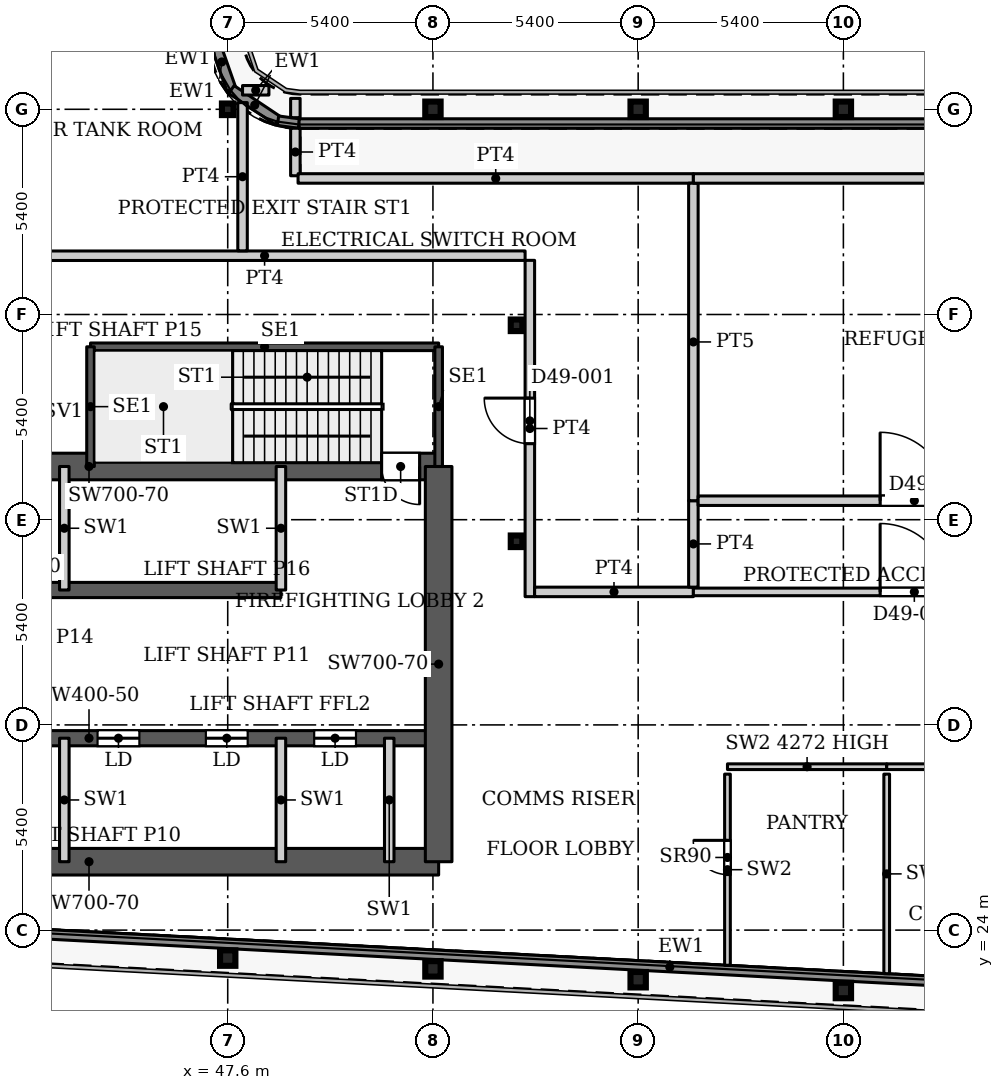
"""IFC4 building model, lengths in metres.
Left out: names, types, materials, properties, quantities, classifications, styles, units other than length and angle.
Written with IfcOpenShell. Run it as: python <this file> out.ifc"""

import sys

from ifc_helpers import new_model, si_unit, direction, frame, frame_2d, origin, origin_2d, place, context, subcontext, project, spatial, rectangle, hollow_rectangle, i_section, extrude, source, transform, mapped, element, fill, save


model = new_model("IFC4")
c1 = context("Model", 3, precision=1e-05, world=origin(), true_north=direction((0.0, 1.0)))
c2 = subcontext(c1, "Body", "Model", "MODEL_VIEW")
j1 = project(units=[si_unit("LENGTHUNIT", "METRE"), si_unit("PLANEANGLEUNIT", "RADIAN")], contexts=[c1])
p1 = place(None, origin())
s1 = spatial("IfcSite", under=j1, at=p1, CompositionType="ELEMENT")
p2 = place(p1, origin())
s2 = spatial("IfcBuilding", under=s1, at=p2, CompositionType="ELEMENT")
p3 = place(p2, frame((0.0, 0.0, 211.1)))
s3 = spatial("IfcBuildingStorey", under=s2, at=p3, CompositionType="ELEMENT", Elevation=211.1)
for number, where, z_axis, x_axis in (
    (1, (63.8, 22.411, 0.0), (0.0, 0.0, 1.0), (1.0, 0.0, 0.0)),
    (2, (58.4, 22.695, 0.0), (0.0, 0.0, 1.0), (1.0, 0.0, 0.0)),
    (3, (53.0, 22.98, 0.0), (0.0, 0.0, 1.0), (1.0, 0.0, 0.0)),
    (4, (47.6, 23.264, 0.0), (0.0, 0.0, 1.0), (1.0, 0.0, 0.0)),
    (5, (53.0, 45.6, 0.0), (0.0, 0.0, 1.0), (1.0, 0.0, 0.0)),
    (6, (58.4, 45.6, 0.0), (0.0, 0.0, 1.0), (1.0, 0.0, 0.0)),
    (7, (63.8, 45.6, 0.0), (0.0, 0.0, 1.0), (1.0, 0.0, 0.0)),
):
    element("IfcColumn", number, at=place(p3, frame(where, z_axis=z_axis, x_axis=x_axis)), inside=s3, PredefinedType="COLUMN", context=c2, shape_type="SweptSolid", body=[
        extrude(i_section(OverallWidth=0.404, OverallDepth=0.407, WebThickness=0.027, FlangeThickness=0.044, FilletRadius=0.012, at=origin_2d()), origin(), (0.0, 0.0, 1.0), 5.1),
    ])
for number, where, z_axis, x_axis in (
    (8, (55.2, 34.232, 0.0), (0.0, 0.0, 1.0), (1.0, 0.0, 0.0)),
    (9, (55.2, 39.916, 0.0), (0.0, 0.0, 1.0), (1.0, 0.0, 0.0)),
    (10, (47.6, 45.6, 0.0), (0.0, 0.0, 1.0), (1.0, 0.0, 0.0)),
):
    element("IfcColumn", number, at=place(p3, frame(where, z_axis=z_axis, x_axis=x_axis)), inside=s3, PredefinedType="COLUMN", context=c2, shape_type="SweptSolid", body=[
        extrude(hollow_rectangle(XDim=0.305, YDim=0.305, WallThickness=0.016, InnerFilletRadius=0.016, OuterFilletRadius=0.032, at=origin_2d()), origin(), (0.0, 0.0, 1.0), 5.1),
    ])
p4 = place(p3, frame((34.75, 25.8, 0.0), z_axis=(0.0, 0.0, 1.0), x_axis=(1.0, 0.0, 0.0)))
e11 = element("IfcWall", 11, at=p4, inside=s3, PredefinedType="SHEAR", context=c2, shape_type="SweptSolid", body=[
    extrude(rectangle(XDim=18.4, YDim=0.7, at=frame_2d((9.2, 0.0))), origin(), (0.0, 0.0, 1.0), 5.1),
])
p5 = place(p3, frame((34.75, 29.05, 0.0), z_axis=(0.0, 0.0, 1.0), x_axis=(1.0, 0.0, 0.0)))
e12 = element("IfcWall", 12, at=p5, inside=s3, PredefinedType="SHEAR", context=c2, shape_type="SweptSolid", body=[
    extrude(rectangle(XDim=18.4, YDim=0.4, at=frame_2d((9.2, 0.0))), origin(), (0.0, 0.0, 1.0), 5.1),
])
p6 = place(p5, frame((0.875, 0.0, 0.0)))
e13 = element("IfcOpeningElement", 13, at=p6, cuts=e12, PredefinedType="OPENING", context=c2, shape_type="SweptSolid", body=[
    extrude(rectangle(XDim=1.1, YDim=2.2, at=frame_2d((0.55, 1.1))), frame((0.0, 0.21, 0.0), z_axis=(0.0, -1.0, 0.0), x_axis=(1.0, 0.0, 0.0)), (0.0, 0.0, 1.0), 0.42),
])
p7 = place(p5, frame((3.725, 0.0, 0.0)))
e14 = element("IfcOpeningElement", 14, at=p7, cuts=e12, PredefinedType="OPENING", context=c2, shape_type="SweptSolid", body=[
    extrude(rectangle(XDim=1.1, YDim=2.2, at=frame_2d((0.55, 1.1))), frame((0.0, 0.21, 0.0), z_axis=(0.0, -1.0, 0.0), x_axis=(1.0, 0.0, 0.0)), (0.0, 0.0, 1.0), 0.42),
])
p8 = place(p5, frame((6.575, 0.0, 0.0)))
e15 = element("IfcOpeningElement", 15, at=p8, cuts=e12, PredefinedType="OPENING", context=c2, shape_type="SweptSolid", body=[
    extrude(rectangle(XDim=1.1, YDim=2.2, at=frame_2d((0.55, 1.1))), frame((0.0, 0.21, 0.0), z_axis=(0.0, -1.0, 0.0), x_axis=(1.0, 0.0, 0.0)), (0.0, 0.0, 1.0), 0.42),
])
p9 = place(p5, frame((9.425, 0.0, 0.0)))
e16 = element("IfcOpeningElement", 16, at=p9, cuts=e12, PredefinedType="OPENING", context=c2, shape_type="SweptSolid", body=[
    extrude(rectangle(XDim=1.1, YDim=2.2, at=frame_2d((0.55, 1.1))), frame((0.0, 0.21, 0.0), z_axis=(0.0, -1.0, 0.0), x_axis=(1.0, 0.0, 0.0)), (0.0, 0.0, 1.0), 0.42),
])
p10 = place(p5, frame((12.275, 0.0, 0.0)))
e17 = element("IfcOpeningElement", 17, at=p10, cuts=e12, PredefinedType="OPENING", context=c2, shape_type="SweptSolid", body=[
    extrude(rectangle(XDim=1.1, YDim=2.2, at=frame_2d((0.55, 1.1))), frame((0.0, 0.21, 0.0), z_axis=(0.0, -1.0, 0.0), x_axis=(1.0, 0.0, 0.0)), (0.0, 0.0, 1.0), 0.42),
])
p11 = place(p5, frame((15.125, 0.0, 0.0)))
e18 = element("IfcOpeningElement", 18, at=p11, cuts=e12, PredefinedType="OPENING", context=c2, shape_type="SweptSolid", body=[
    extrude(rectangle(XDim=1.1, YDim=2.2, at=frame_2d((0.55, 1.1))), frame((0.0, 0.21, 0.0), z_axis=(0.0, -1.0, 0.0), x_axis=(1.0, 0.0, 0.0)), (0.0, 0.0, 1.0), 0.42),
])
p12 = place(p3, frame((34.75, 32.95, 0.0), z_axis=(0.0, 0.0, 1.0), x_axis=(1.0, 0.0, 0.0)))
e19 = element("IfcWall", 19, at=p12, inside=s3, PredefinedType="SHEAR", context=c2, shape_type="SweptSolid", body=[
    extrude(rectangle(XDim=14.25, YDim=0.4, at=frame_2d((7.125, 0.0))), origin(), (0.0, 0.0, 1.0), 5.1),
])
p13 = place(p3, frame((34.75, 36.2, 0.0), z_axis=(0.0, 0.0, 1.0), x_axis=(1.0, 0.0, 0.0)))
e20 = element("IfcWall", 20, at=p13, inside=s3, PredefinedType="SHEAR", context=c2, shape_type="SweptSolid", body=[
    extrude(rectangle(XDim=18.4, YDim=0.7, at=frame_2d((9.2, 0.0))), origin(), (0.0, 0.0, 1.0), 5.1),
])
p14 = place(p13, frame((16.9, 0.0, 0.0)))
e21 = element("IfcOpeningElement", 21, at=p14, cuts=e20, PredefinedType="OPENING", context=c2, shape_type="SweptSolid", body=[
    extrude(rectangle(XDim=1.0, YDim=2.2, at=frame_2d((0.5, 1.1))), frame((0.0, 0.36, 0.0), z_axis=(0.0, -1.0, 0.0), x_axis=(1.0, 0.0, 0.0)), (0.0, 0.0, 1.0), 0.72),
])
p15 = place(p3, frame((53.15, 25.8, 0.0), z_axis=(0.0, 0.0, 1.0), x_axis=(0.0, 1.0, 0.0)))
e22 = element("IfcWall", 22, at=p15, inside=s3, PredefinedType="SHEAR", context=c2, shape_type="SweptSolid", body=[
    extrude(rectangle(XDim=10.4, YDim=0.7, at=frame_2d((5.2, 0.0))), origin(), (0.0, 0.0, 1.0), 5.1),
])
p16 = place(p3, frame((84.427, 21.701, 0.0), z_axis=(0.0, 0.0, 1.0), x_axis=(-0.998617722402, 0.052560864767, 0.0)))
e23 = element("IfcWall", 23, at=p16, inside=s3, PredefinedType="SOLIDWALL", context=c2, shape_type="SweptSolid", body=[
    extrude(rectangle(XDim=50.458, YDim=0.25, at=frame_2d((25.229, 0.0))), origin(), (0.0, 0.0, 1.0), 4.95),
])
p17 = place(p3, frame((47.188, 47.571, 0.0), z_axis=(0.0, 0.0, 1.0), x_axis=(0.331615835646, -0.943414509931, 0.0)))
e24 = element("IfcWall", 24, at=p17, inside=s3, PredefinedType="SOLIDWALL", context=c2, shape_type="SweptSolid", body=[
    extrude(rectangle(XDim=1.538, YDim=0.25, at=frame_2d((0.769, 0.0))), origin(), (0.0, 0.0, 1.0), 4.95),
])
p18 = place(p3, frame((47.698, 46.12, 0.0), z_axis=(0.0, 0.0, 1.0), x_axis=(0.831209040074, -0.555960009082, 0.0)))
e25 = element("IfcWall", 25, at=p18, inside=s3, PredefinedType="SOLIDWALL", context=c2, shape_type="SweptSolid", body=[
    extrude(rectangle(XDim=1.475, YDim=0.25, at=frame_2d((0.738, 0.0))), origin(), (0.0, 0.0, 1.0), 4.95),
])
p19 = place(p3, frame((48.924, 45.3, 0.0), z_axis=(0.0, 0.0, 1.0), x_axis=(0.990938998022, -0.134312703043, 0.0)))
e26 = element("IfcWall", 26, at=p19, inside=s3, PredefinedType="SOLIDWALL", context=c2, shape_type="SweptSolid", body=[
    extrude(rectangle(XDim=0.558, YDim=0.25, at=frame_2d((0.279, 0.0))), origin(), (0.0, 0.0, 1.0), 4.95),
])
p20 = place(p3, frame((49.477, 45.225, 0.0), z_axis=(0.0, 0.0, 1.0), x_axis=(1.0, 0.0, 0.0)))
e27 = element("IfcWall", 27, at=p20, inside=s3, PredefinedType="SOLIDWALL", context=c2, shape_type="SweptSolid", body=[
    extrude(rectangle(XDim=34.812, YDim=0.25, at=frame_2d((17.406, 0.0))), origin(), (0.0, 0.0, 1.0), 4.95),
])
p21 = place(p3, frame((43.99, 39.35, 0.0), z_axis=(0.0, 0.0, 1.0), x_axis=(1.0, 0.0, 0.0)))
e28 = element("IfcWall", 28, at=p21, inside=s3, PredefinedType="SHEAR", context=c2, shape_type="SweptSolid", body=[
    extrude(rectangle(XDim=9.16, YDim=0.2, at=frame_2d((4.58, 0.0))), origin(), (0.0, 0.0, 1.0), 5.1),
])
for number, where, z_axis, x_axis in (
    (29, (43.99, 36.2, 0.0), (0.0, 0.0, 1.0), (0.0, 1.0, 0.0)),
    (30, (53.15, 36.2, 0.0), (0.0, 0.0, 1.0), (0.0, 1.0, 0.0)),
):
    element("IfcWall", number, at=place(p3, frame(where, z_axis=z_axis, x_axis=x_axis)), inside=s3, PredefinedType="SHEAR", context=c2, shape_type="SweptSolid", body=[
        extrude(rectangle(XDim=3.15, YDim=0.2, at=frame_2d((1.575, 0.0))), origin(), (0.0, 0.0, 1.0), 5.1),
    ])
for number, where, z_axis, x_axis in (
    (31, (43.3, 25.8, 0.0), (0.0, 0.0, 1.0), (0.0, 1.0, 0.0)),
    (32, (43.3, 32.95, 0.0), (0.0, 0.0, 1.0), (0.0, 1.0, 0.0)),
    (33, (49.0, 25.8, 0.0), (0.0, 0.0, 1.0), (0.0, 1.0, 0.0)),
    (34, (49.0, 32.95, 0.0), (0.0, 0.0, 1.0), (0.0, 1.0, 0.0)),
    (35, (51.85, 25.8, 0.0), (0.0, 0.0, 1.0), (0.0, 1.0, 0.0)),
):
    element("IfcWall", number, at=place(p3, frame(where, z_axis=z_axis, x_axis=x_axis)), inside=s3, PredefinedType="PARTITIONING", context=c2, shape_type="SweptSolid", body=[
        extrude(rectangle(XDim=3.25, YDim=0.25, at=frame_2d((1.625, 0.0))), origin(), (0.0, 0.0, 1.0), 5.1),
    ])
p22 = place(p3, frame((60.75, 28.3, 0.0), z_axis=(0.0, 0.0, 1.0), x_axis=(1.0, 0.0, 0.0)))
e36 = element("IfcWall", 36, at=p22, inside=s3, PredefinedType="PARTITIONING", context=c2, shape_type="SweptSolid", body=[
    extrude(rectangle(XDim=4.19, YDim=0.15, at=frame_2d((2.095, 0.0))), origin(), (0.0, 0.0, 1.0), 4.272),
])
p23 = place(p3, frame((60.75, 23.075, 0.0), z_axis=(0.0, 0.0, 1.0), x_axis=(0.0, 1.0, 0.0)))
e37 = element("IfcWall", 37, at=p23, inside=s3, PredefinedType="PARTITIONING", context=c2, shape_type="SweptSolid", body=[
    extrude(rectangle(XDim=5.03, YDim=0.15, at=frame_2d((2.515, 0.0))), origin(), (0.0, 0.0, 1.0), 5.1),
])
p24 = place(p23, frame((2.387, 0.0, 0.0)))
e38 = element("IfcOpeningElement", 38, at=p24, cuts=e37, PredefinedType="OPENING", context=c2, shape_type="SweptSolid", body=[
    extrude(rectangle(XDim=0.9, YDim=2.2, at=frame_2d((0.45, 1.1))), frame((0.0, 0.085, 0.0), z_axis=(0.0, -1.0, 0.0), x_axis=(1.0, 0.0, 0.0)), (0.0, 0.0, 1.0), 0.17),
])
p25 = place(p3, frame((64.94, 22.854, 0.0), z_axis=(0.0, 0.0, 1.0), x_axis=(0.0, 1.0, 0.0)))
e39 = element("IfcWall", 39, at=p25, inside=s3, PredefinedType="PARTITIONING", context=c2, shape_type="SweptSolid", body=[
    extrude(rectangle(XDim=5.251, YDim=0.15, at=frame_2d((2.625, 0.0))), origin(), (0.0, 0.0, 1.0), 5.1),
])
p26 = place(p3, frame((64.94, 28.3, 0.0), z_axis=(0.0, 0.0, 1.0), x_axis=(1.0, 0.0, 0.0)))
e40 = element("IfcWall", 40, at=p26, inside=s3, PredefinedType="PARTITIONING", context=c2, shape_type="SweptSolid", body=[
    extrude(rectangle(XDim=5.81, YDim=0.15, at=frame_2d((2.905, 0.0))), origin(), (0.0, 0.0, 1.0), 5.1),
])
p27 = place(p26, frame((2.455, 0.0, 0.0)))
e41 = element("IfcOpeningElement", 41, at=p27, cuts=e40, PredefinedType="OPENING", context=c2, shape_type="SweptSolid", body=[
    extrude(rectangle(XDim=0.9, YDim=2.2, at=frame_2d((0.45, 1.1))), frame((0.0, 0.085, 0.0), z_axis=(0.0, -1.0, 0.0), x_axis=(1.0, 0.0, 0.0)), (0.0, 0.0, 1.0), 0.17),
])
p28 = place(p3, frame((41.715, 41.746, 0.0), z_axis=(0.0, 0.0, 1.0), x_axis=(0.999999989853, 0.000142460288, 0.0)))
e42 = element("IfcWall", 42, at=p28, inside=s3, PredefinedType="PARTITIONING", context=c2, shape_type="SweptSolid", body=[
    extrude(rectangle(XDim=13.71, YDim=0.25, at=frame_2d((6.855, 0.0))), origin(), (0.0, 0.0, 1.0), 4.8),
])
p29 = place(p3, frame((47.99, 41.875, 0.0), z_axis=(0.0, 0.0, 1.0), x_axis=(0.0, 1.0, 0.0)))
e43 = element("IfcWall", 43, at=p29, inside=s3, PredefinedType="PARTITIONING", context=c2, shape_type="SweptSolid", body=[
    extrude(rectangle(XDim=3.901, YDim=0.25, at=frame_2d((1.95, 0.0))), origin(), (0.0, 0.0, 1.0), 4.8),
])
p30 = place(p3, frame((47.99, 46.1, 0.0), z_axis=(0.0, 0.0, 1.0), x_axis=(1.0, 0.0, 0.0)))
e44 = element("IfcWall", 44, at=p30, inside=s3, PredefinedType="PARTITIONING", context=c2, shape_type="SweptSolid", body=[
    extrude(rectangle(XDim=0.694, YDim=0.25, at=frame_2d((0.347, 0.0))), origin(), (0.0, 0.0, 1.0), 4.8),
])
p31 = place(p3, frame((49.38, 43.851, 0.0), z_axis=(0.0, 0.0, 1.0), x_axis=(0.0, 1.0, 0.0)))
e45 = element("IfcWall", 45, at=p31, inside=s3, PredefinedType="PARTITIONING", context=c2, shape_type="SweptSolid", body=[
    extrude(rectangle(XDim=1.25, YDim=0.25, at=frame_2d((0.625, 0.0))), origin(), (0.0, 0.0, 1.0), 4.8),
])
p32 = place(p3, frame((49.38, 45.38, 0.0), z_axis=(0.0, 0.0, 1.0), x_axis=(0.0, 1.0, 0.0)))
e46 = element("IfcWall", 46, at=p32, inside=s3, PredefinedType="PARTITIONING", context=c2, shape_type="SweptSolid", body=[
    extrude(rectangle(XDim=0.507, YDim=0.25, at=frame_2d((0.253, 0.0))), origin(), (0.0, 0.0, 1.0), 4.8),
])
p33 = place(p3, frame((49.451, 43.78, 0.0), z_axis=(0.0, 0.0, 1.0), x_axis=(1.0, 0.0, 0.0)))
e47 = element("IfcWall", 47, at=p33, inside=s3, PredefinedType="PARTITIONING", context=c2, shape_type="SweptSolid", body=[
    extrude(rectangle(XDim=10.402, YDim=0.25, at=frame_2d((5.201, 0.0))), origin(), (0.0, 0.0, 1.0), 4.8),
])
p34 = place(p3, frame((55.55, 32.775, 0.0), z_axis=(0.0, 0.0, 1.0), x_axis=(0.0, 1.0, 0.0)))
e48 = element("IfcWall", 48, at=p34, inside=s3, PredefinedType="PARTITIONING", context=c2, shape_type="SweptSolid", body=[
    extrude(rectangle(XDim=8.85, YDim=0.25, at=frame_2d((4.425, 0.0))), origin(), (0.0, 0.0, 1.0), 4.8),
])
p35 = place(p34, frame((4.025, 0.0, 0.0)))
e49 = element("IfcOpeningElement", 49, at=p35, cuts=e48, PredefinedType="OPENING", context=c2, shape_type="SweptSolid", body=[
    extrude(rectangle(XDim=1.2, YDim=2.1, at=frame_2d((0.6, 1.05))), frame((0.0, 0.135, 0.0), z_axis=(0.0, -1.0, 0.0), x_axis=(1.0, 0.0, 0.0)), (0.0, 0.0, 1.0), 0.27),
])
p36 = place(p3, frame((55.675, 32.9, 0.0), z_axis=(0.0, 0.0, 1.0), x_axis=(1.0, 0.0, 0.0)))
e50 = element("IfcWall", 50, at=p36, inside=s3, PredefinedType="PARTITIONING", context=c2, shape_type="SweptSolid", body=[
    extrude(rectangle(XDim=4.178, YDim=0.25, at=frame_2d((2.089, 0.0))), origin(), (0.0, 0.0, 1.0), 4.8),
])
p37 = place(p3, frame((59.853, 32.9, 0.0), z_axis=(0.0, 0.0, 1.0), x_axis=(1.0, 0.0, 0.0)))
e51 = element("IfcWall", 51, at=p37, inside=s3, PredefinedType="PARTITIONING", context=c2, shape_type="SweptSolid", body=[
    extrude(rectangle(XDim=23.827, YDim=0.2, at=frame_2d((11.914, 0.0))), origin(), (0.0, 0.0, 1.0), 4.8),
])
p38 = place(p37, frame((4.914, 0.0, 0.0)))
e52 = element("IfcOpeningElement", 52, at=p38, cuts=e51, PredefinedType="OPENING", context=c2, shape_type="SweptSolid", body=[
    extrude(rectangle(XDim=1.8, YDim=2.1, at=frame_2d((0.9, 1.05))), frame((0.0, 0.11, 0.0), z_axis=(0.0, -1.0, 0.0), x_axis=(1.0, 0.0, 0.0)), (0.0, 0.0, 1.0), 0.22),
])
p39 = place(p37, frame((16.777, 0.0, 0.0)))
e53 = element("IfcOpeningElement", 53, at=p39, cuts=e51, PredefinedType="OPENING", context=c2, shape_type="SweptSolid", body=[
    extrude(rectangle(XDim=1.8, YDim=2.1, at=frame_2d((0.9, 1.05))), frame((0.0, 0.11, 0.0), z_axis=(0.0, -1.0, 0.0), x_axis=(1.0, 0.0, 0.0)), (0.0, 0.0, 1.0), 0.22),
])
p40 = place(p3, frame((59.853, 33.025, 0.0), z_axis=(0.0, 0.0, 1.0), x_axis=(0.0, 1.0, 0.0)))
e54 = element("IfcWall", 54, at=p40, inside=s3, PredefinedType="PARTITIONING", context=c2, shape_type="SweptSolid", body=[
    extrude(rectangle(XDim=2.275, YDim=0.25, at=frame_2d((1.138, 0.0))), origin(), (0.0, 0.0, 1.0), 4.8),
])
p41 = place(p3, frame((59.853, 35.3, 0.0), z_axis=(0.0, 0.0, 1.0), x_axis=(0.0, 1.0, 0.0)))
e55 = element("IfcWall", 55, at=p41, inside=s3, PredefinedType="PARTITIONING", context=c2, shape_type="SweptSolid", body=[
    extrude(rectangle(XDim=8.355, YDim=0.25, at=frame_2d((4.177, 0.0))), origin(), (0.0, 0.0, 1.0), 4.8),
])
p42 = place(p3, frame((59.853, 43.78, 0.0), z_axis=(0.0, 0.0, 1.0), x_axis=(1.0, 0.0, 0.0)))
e56 = element("IfcWall", 56, at=p42, inside=s3, PredefinedType="PARTITIONING", context=c2, shape_type="SweptSolid", body=[
    extrude(rectangle(XDim=23.852, YDim=0.25, at=frame_2d((11.926, 0.0))), origin(), (0.0, 0.0, 1.0), 4.8),
])
p43 = place(p3, frame((59.978, 35.3, 0.0), z_axis=(0.0, 0.0, 1.0), x_axis=(1.0, 0.0, 0.0)))
e57 = element("IfcWall", 57, at=p43, inside=s3, PredefinedType="PARTITIONING", context=c2, shape_type="SweptSolid", body=[
    extrude(rectangle(XDim=23.477, YDim=0.25, at=frame_2d((11.739, 0.0))), origin(), (0.0, 0.0, 1.0), 4.8),
])
p44 = place(p43, frame((4.789, 0.0, 0.0)))
e58 = element("IfcOpeningElement", 58, at=p44, cuts=e57, PredefinedType="OPENING", context=c2, shape_type="SweptSolid", body=[
    extrude(rectangle(XDim=1.8, YDim=2.1, at=frame_2d((0.9, 1.05))), frame((0.0, 0.135, 0.0), z_axis=(0.0, -1.0, 0.0), x_axis=(1.0, 0.0, 0.0)), (0.0, 0.0, 1.0), 0.27),
])
p45 = place(p43, frame((16.652, 0.0, 0.0)))
e59 = element("IfcOpeningElement", 59, at=p45, cuts=e57, PredefinedType="OPENING", context=c2, shape_type="SweptSolid", body=[
    extrude(rectangle(XDim=1.8, YDim=2.1, at=frame_2d((0.9, 1.05))), frame((0.0, 0.135, 0.0), z_axis=(0.0, -1.0, 0.0), x_axis=(1.0, 0.0, 0.0)), (0.0, 0.0, 1.0), 0.27),
])
m1 = source(origin(), c2, "Body", "SweptSolid", [
    extrude(rectangle(XDim=1.1, YDim=2.2, at=frame_2d((0.55, 1.1))), frame((0.0, 0.025, 0.0), z_axis=(0.0, -1.0, 0.0), x_axis=(1.0, 0.0, 0.0)), (0.0, 0.0, 1.0), 0.05),
])
p46 = place(p9, origin())
e60 = element("IfcDoor", 60, at=p46, inside=s3, OperationType="SLIDING_TO_LEFT", PredefinedType="DOOR", context=c2, shape_type="MappedRepresentation", body=[
    mapped(m1, transform((0.0, 0.0, 0.0), x_axis=(1.0, 0.0, 0.0), y_axis=(0.0, 1.0, 0.0), z_axis=(0.0, 0.0, 1.0), scale=1.0)),
])
fill(e16, e60)
p47 = place(p10, origin())
e61 = element("IfcDoor", 61, at=p47, inside=s3, OperationType="SLIDING_TO_LEFT", PredefinedType="DOOR", context=c2, shape_type="MappedRepresentation", body=[
    mapped(m1, transform((0.0, 0.0, 0.0), x_axis=(1.0, 0.0, 0.0), y_axis=(0.0, 1.0, 0.0), z_axis=(0.0, 0.0, 1.0), scale=1.0)),
])
fill(e17, e61)
p48 = place(p11, origin())
e62 = element("IfcDoor", 62, at=p48, inside=s3, OperationType="SLIDING_TO_LEFT", PredefinedType="DOOR", context=c2, shape_type="MappedRepresentation", body=[
    mapped(m1, transform((0.0, 0.0, 0.0), x_axis=(1.0, 0.0, 0.0), y_axis=(0.0, 1.0, 0.0), z_axis=(0.0, 0.0, 1.0), scale=1.0)),
])
fill(e18, e62)
m2 = source(origin(), c2, "Body", "SweptSolid", [
    extrude(rectangle(XDim=0.9, YDim=2.2, at=frame_2d((0.45, 1.1))), frame((0.0, 0.025, 0.0), z_axis=(0.0, -1.0, 0.0), x_axis=(1.0, 0.0, 0.0)), (0.0, 0.0, 1.0), 0.05),
])
p49 = place(p24, origin())
e63 = element("IfcDoor", 63, at=p49, inside=s3, OperationType="SINGLE_SWING_LEFT", PredefinedType="DOOR", context=c2, shape_type="MappedRepresentation", body=[
    mapped(m2, transform((0.0, 0.0, 0.0), x_axis=(1.0, 0.0, 0.0), y_axis=(0.0, 1.0, 0.0), z_axis=(0.0, 0.0, 1.0), scale=1.0)),
])
fill(e38, e63)
m3 = source(origin(), c2, "Body", "SweptSolid", [
    extrude(rectangle(XDim=1.0, YDim=2.2, at=frame_2d((0.5, 1.1))), frame((0.0, 0.025, 0.0), z_axis=(0.0, -1.0, 0.0), x_axis=(1.0, 0.0, 0.0)), (0.0, 0.0, 1.0), 0.05),
])
p50 = place(p14, origin())
e64 = element("IfcDoor", 64, at=p50, inside=s3, OperationType="SINGLE_SWING_RIGHT", PredefinedType="DOOR", context=c2, shape_type="MappedRepresentation", body=[
    mapped(m3, transform((0.0, 0.0, 0.0), x_axis=(1.0, 0.0, 0.0), y_axis=(0.0, 1.0, 0.0), z_axis=(0.0, 0.0, 1.0), scale=1.0)),
])
fill(e21, e64)
m4 = source(origin(), c2, "Body", "SweptSolid", [
    extrude(rectangle(XDim=1.2, YDim=2.1, at=frame_2d((0.6, 1.05))), frame((0.0, 0.025, 0.0), z_axis=(0.0, -1.0, 0.0), x_axis=(1.0, 0.0, 0.0)), (0.0, 0.0, 1.0), 0.05),
])
p51 = place(p35, origin())
e65 = element("IfcDoor", 65, at=p51, inside=s3, OperationType="SINGLE_SWING_LEFT", PredefinedType="DOOR", context=c2, shape_type="MappedRepresentation", body=[
    mapped(m4, transform((0.0, 0.0, 0.0), x_axis=(1.0, 0.0, 0.0), y_axis=(0.0, 1.0, 0.0), z_axis=(0.0, 0.0, 1.0), scale=1.0)),
])
fill(e49, e65)
m5 = source(origin(), c2, "Body", "SweptSolid", [
    extrude(rectangle(XDim=1.8, YDim=2.1, at=frame_2d((0.9, 1.05))), frame((0.0, 0.025, 0.0), z_axis=(0.0, -1.0, 0.0), x_axis=(1.0, 0.0, 0.0)), (0.0, 0.0, 1.0), 0.05),
])
p52 = place(p44, origin())
e66 = element("IfcDoor", 66, at=p52, inside=s3, OperationType="DOUBLE_DOOR_SINGLE_SWING", PredefinedType="DOOR", context=c2, shape_type="MappedRepresentation", body=[
    mapped(m5, transform((0.0, 0.0, 0.0), x_axis=(1.0, 0.0, 0.0), y_axis=(0.0, 1.0, 0.0), z_axis=(0.0, 0.0, 1.0), scale=1.0)),
])
fill(e58, e66)
m6 = source(origin(), c2, "Body", "SweptSolid", [
    extrude(rectangle(XDim=1.8, YDim=2.1, at=frame_2d((0.9, 1.05))), frame((0.0, 0.025, 0.0), z_axis=(0.0, -1.0, 0.0), x_axis=(1.0, 0.0, 0.0)), (0.0, 0.0, 1.0), 0.05),
])
p53 = place(p38, origin())
e67 = element("IfcDoor", 67, at=p53, inside=s3, OperationType="DOUBLE_DOOR_SINGLE_SWING", PredefinedType="DOOR", context=c2, shape_type="MappedRepresentation", body=[
    mapped(m6, transform((0.0, 0.0, 0.0), x_axis=(1.0, 0.0, 0.0), y_axis=(0.0, 1.0, 0.0), z_axis=(0.0, 0.0, 1.0), scale=1.0)),
])
fill(e52, e67)
save(model, sys.argv[1])
